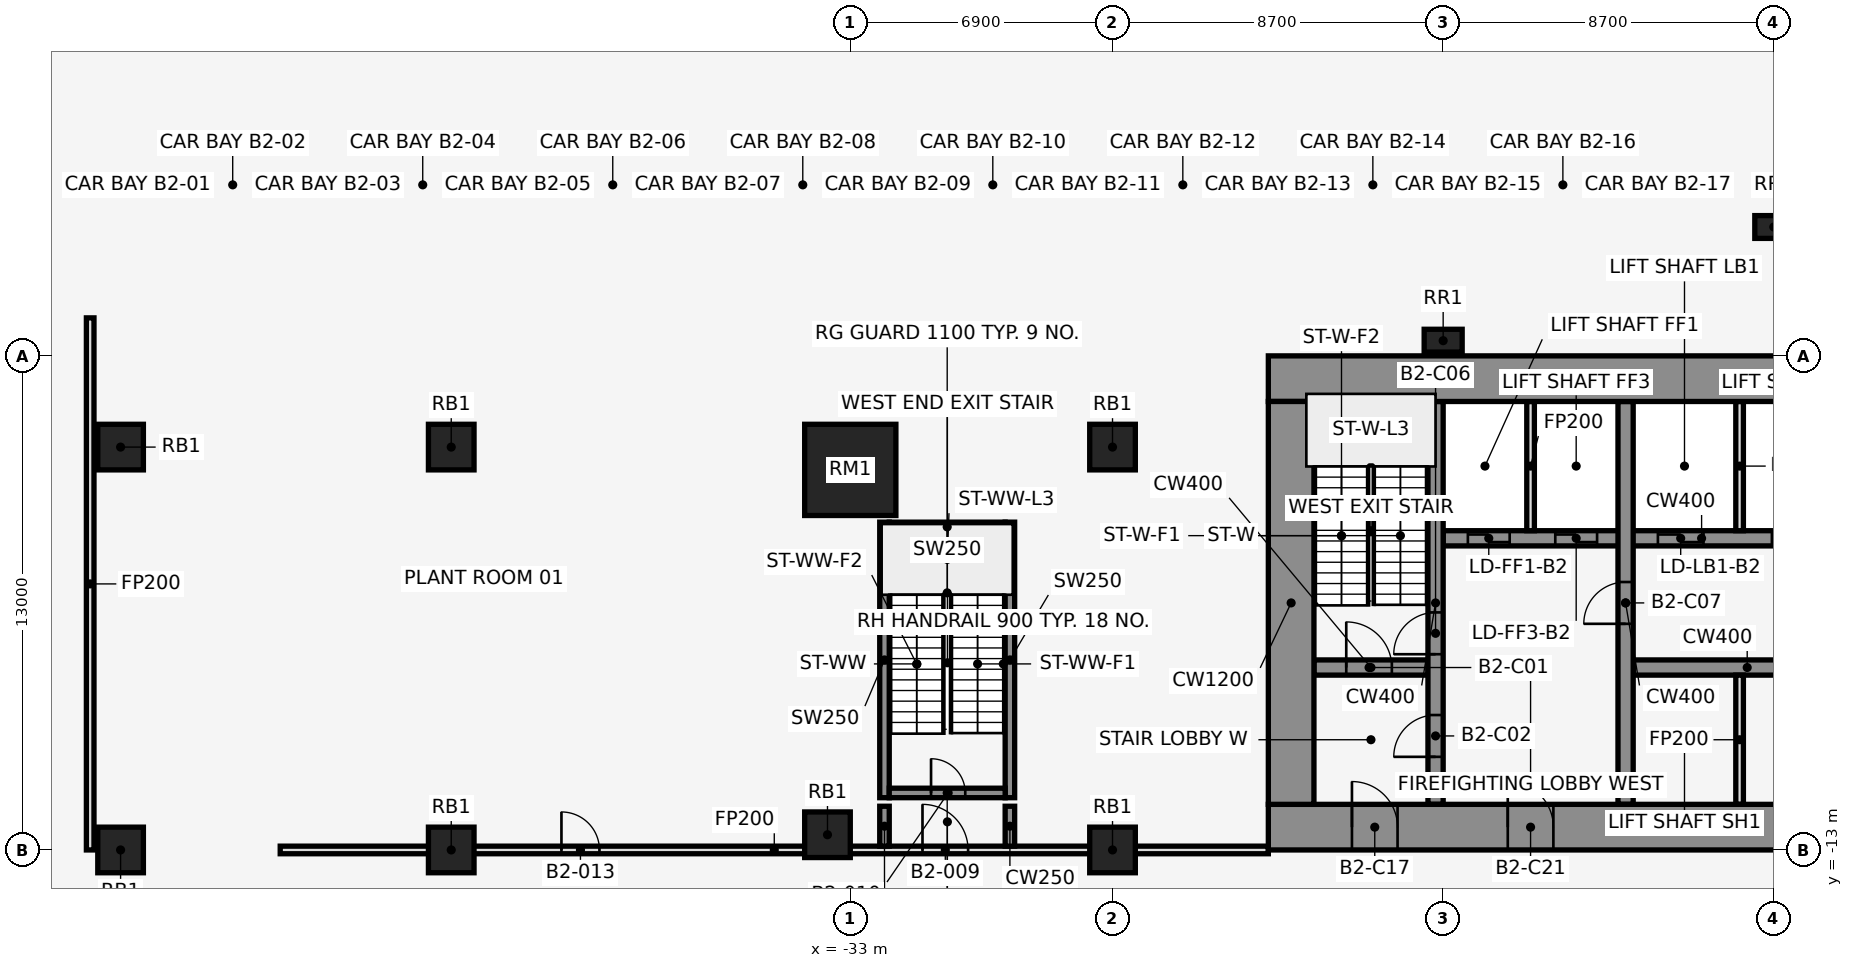
"""IFC4 building model, lengths in metres.
Left out: names, types, materials, properties, quantities, classifications, styles, units other than length and angle.
Written with IfcOpenShell. Run it as: python <this file> out.ifc"""

import sys

from ifc_helpers import new_model, si_unit, direction, frame, frame_2d, origin, origin_2d, place, context, subcontext, project, spatial, rectangle, extrude, element, fill, save


model = new_model("IFC4")
c1 = context("Model", 3, precision=1e-05, world=origin(), true_north=direction((0.0, 1.0)))
c2 = subcontext(c1, "Body", "Model", "MODEL_VIEW")
j1 = project(units=[si_unit("LENGTHUNIT", "METRE"), si_unit("PLANEANGLEUNIT", "RADIAN")], contexts=[c1])
p1 = place(None, origin())
s1 = spatial("IfcSite", under=j1, at=p1, CompositionType="ELEMENT")
p2 = place(p1, origin())
s2 = spatial("IfcBuilding", under=s1, at=p2, CompositionType="ELEMENT")
p3 = place(p2, frame((0.0, 0.0, -10.0)))
s3 = spatial("IfcBuildingStorey", under=s2, at=p3, CompositionType="ELEMENT", Elevation=-10.0)
p4 = place(p3, frame((-33.0, -3.0, 0.0), z_axis=(0.0, 0.0, 1.0), x_axis=(1.0, 0.0, 0.0)))
e1 = element("IfcColumn", 1, at=p4, inside=s3, PredefinedType="COLUMN", context=c2, shape_type="SweptSolid", body=[
    extrude(rectangle(XDim=2.4, YDim=2.4, at=origin_2d()), origin(), (0.0, 0.0, 1.0), 5.0),
])
p5 = place(p3, frame((-26.1, -2.4, 0.0), z_axis=(0.0, 0.0, 1.0), x_axis=(1.0, 0.0, 0.0)))
e2 = element("IfcColumn", 2, at=p5, inside=s3, PredefinedType="COLUMN", context=c2, shape_type="SweptSolid", body=[
    extrude(rectangle(XDim=1.2, YDim=1.2, at=origin_2d()), origin(), (0.0, 0.0, 1.0), 5.0),
])
for number, where, z_axis, x_axis in (
    (3, (-8.7, 3.391, 0.0), (0.0, 0.0, 1.0), (1.0, 0.0, 0.0)),
    (4, (-17.4, 0.4, 0.0), (0.0, 0.0, 1.0), (1.0, 0.0, 0.0)),
):
    element("IfcColumn", number, at=place(p3, frame(where, z_axis=z_axis, x_axis=x_axis)), inside=s3, PredefinedType="COLUMN", context=c2, shape_type="SweptSolid", body=[
        extrude(rectangle(XDim=1.0, YDim=0.6, at=origin_2d()), origin(), (0.0, 0.0, 1.0), 5.0),
    ])
for number, where, z_axis, x_axis in (
    (5, (-33.6, -12.6, 0.0), (0.0, 0.0, 1.0), (1.0, 0.0, 0.0)),
    (6, (-52.2, -2.4, 0.0), (0.0, 0.0, 1.0), (1.0, 0.0, 0.0)),
    (7, (-52.2, -13.0, 0.0), (0.0, 0.0, 1.0), (1.0, 0.0, 0.0)),
    (8, (-43.5, -2.4, 0.0), (0.0, 0.0, 1.0), (1.0, 0.0, 0.0)),
    (9, (-43.5, -13.0, 0.0), (0.0, 0.0, 1.0), (1.0, 0.0, 0.0)),
    (10, (-26.1, -13.0, 0.0), (0.0, 0.0, 1.0), (1.0, 0.0, 0.0)),
):
    element("IfcColumn", number, at=place(p3, frame(where, z_axis=z_axis, x_axis=x_axis)), inside=s3, PredefinedType="COLUMN", context=c2, shape_type="SweptSolid", body=[
        extrude(rectangle(XDim=1.2, YDim=1.2, at=origin_2d()), origin(), (0.0, 0.0, 1.0), 5.0),
    ])
for number, where, z_axis, x_axis in (
    (11, (-32.1, -11.625, 0.0), (0.0, 0.0, 1.0), (0.0, 1.0, 0.0)),
    (12, (-28.8, -11.625, 0.0), (0.0, 0.0, 1.0), (0.0, 1.0, 0.0)),
):
    element("IfcWall", number, at=place(p3, frame(where, z_axis=z_axis, x_axis=x_axis)), inside=s3, PredefinedType="SHEAR", context=c2, shape_type="SweptSolid", body=[
        extrude(rectangle(XDim=7.25, YDim=0.25, at=frame_2d((3.625, 0.0))), origin(), (0.0, 0.0, 1.0), 5.0),
    ])
p6 = place(p3, frame((-31.975, -11.5, 0.0), z_axis=(0.0, 0.0, 1.0), x_axis=(1.0, 0.0, 0.0)))
e13 = element("IfcWall", 13, at=p6, inside=s3, PredefinedType="SHEAR", context=c2, shape_type="SweptSolid", body=[
    extrude(rectangle(XDim=3.05, YDim=0.25, at=frame_2d((1.525, 0.0))), origin(), (0.0, 0.0, 1.0), 5.0),
])
p7 = place(p6, frame((1.1, 0.0, 0.0)))
e14 = element("IfcOpeningElement", 14, at=p7, cuts=e13, PredefinedType="OPENING", context=c2, shape_type="SweptSolid", body=[
    extrude(rectangle(XDim=0.9, YDim=2.1, at=frame_2d((0.45, 1.05))), frame((0.0, 0.137, 0.0), z_axis=(0.0, -1.0, 0.0), x_axis=(1.0, 0.0, 0.0)), (0.0, 0.0, 1.0), 0.274),
])
p8 = place(p3, frame((-31.975, -4.5, 0.0), z_axis=(0.0, 0.0, 1.0), x_axis=(1.0, 0.0, 0.0)))
e15 = element("IfcWall", 15, at=p8, inside=s3, PredefinedType="SHEAR", context=c2, shape_type="SweptSolid", body=[
    extrude(rectangle(XDim=3.05, YDim=0.25, at=frame_2d((1.525, 0.0))), origin(), (0.0, 0.0, 1.0), 5.0),
])
p9 = place(p3, frame((-48.0, -13.0, 0.0), z_axis=(0.0, 0.0, 1.0), x_axis=(1.0, 0.0, 0.0)))
e16 = element("IfcWall", 16, at=p9, inside=s3, PredefinedType="PARTITIONING", context=c2, shape_type="SweptSolid", body=[
    extrude(rectangle(XDim=26.0, YDim=0.2, at=frame_2d((13.0, 0.0))), origin(), (0.0, 0.0, 1.0), 4.7),
])
p10 = place(p9, frame((16.9, 0.0, 0.0)))
e17 = element("IfcOpeningElement", 17, at=p10, cuts=e16, PredefinedType="OPENING", context=c2, shape_type="SweptSolid", body=[
    extrude(rectangle(XDim=1.2, YDim=2.1, at=frame_2d((0.6, 1.05))), frame((0.0, 0.112, 0.0), z_axis=(0.0, -1.0, 0.0), x_axis=(1.0, 0.0, 0.0)), (0.0, 0.0, 1.0), 0.224),
])
p11 = place(p9, frame((7.4, 0.0, 0.0)))
e18 = element("IfcOpeningElement", 18, at=p11, cuts=e16, PredefinedType="OPENING", context=c2, shape_type="SweptSolid", body=[
    extrude(rectangle(XDim=1.0, YDim=2.1, at=frame_2d((0.5, 1.05))), frame((0.0, 0.112, 0.0), z_axis=(0.0, -1.0, 0.0), x_axis=(1.0, 0.0, 0.0)), (0.0, 0.0, 1.0), 0.224),
])
p12 = place(p3, frame((-53.0, -13.0, 0.0), z_axis=(0.0, 0.0, 1.0), x_axis=(0.0, 1.0, 0.0)))
e19 = element("IfcWall", 19, at=p12, inside=s3, PredefinedType="PARTITIONING", context=c2, shape_type="SweptSolid", body=[
    extrude(rectangle(XDim=14.0, YDim=0.2, at=frame_2d((7.0, 0.0))), origin(), (0.0, 0.0, 1.0), 4.7),
])
for number, where, z_axis, x_axis in (
    (20, (-32.1, -12.9, 0.0), (0.0, 0.0, 1.0), (0.0, 1.0, 0.0)),
    (21, (-28.8, -12.9, 0.0), (0.0, 0.0, 1.0), (0.0, 1.0, 0.0)),
):
    element("IfcWall", number, at=place(p3, frame(where, z_axis=z_axis, x_axis=x_axis)), inside=s3, PredefinedType="SHEAR", context=c2, shape_type="SweptSolid", body=[
        extrude(rectangle(XDim=1.05, YDim=0.25, at=frame_2d((0.525, 0.0))), origin(), (0.0, 0.0, 1.0), 5.0),
    ])
p13 = place(p3, frame((-20.8, -8.2, 0.0), z_axis=(0.0, 0.0, 1.0), x_axis=(1.0, 0.0, 0.0)))
e22 = element("IfcWall", 22, at=p13, inside=s3, PredefinedType="SHEAR", context=c2, shape_type="SweptSolid", body=[
    extrude(rectangle(XDim=3.0, YDim=0.4, at=frame_2d((1.5, 0.0))), origin(), (0.0, 0.0, 1.0), 5.0),
])
p14 = place(p13, frame((0.85, 0.0, 0.0)))
e23 = element("IfcOpeningElement", 23, at=p14, cuts=e22, PredefinedType="OPENING", context=c2, shape_type="SweptSolid", body=[
    extrude(rectangle(XDim=1.2, YDim=2.1, at=frame_2d((0.6, 1.05))), frame((0.0, 0.212, 0.0), z_axis=(0.0, -1.0, 0.0), x_axis=(1.0, 0.0, 0.0)), (0.0, 0.0, 1.0), 0.424),
])
p15 = place(p3, frame((-12.4, -8.2, 0.0), z_axis=(0.0, 0.0, 1.0), x_axis=(1.0, 0.0, 0.0)))
e24 = element("IfcWall", 24, at=p15, inside=s3, PredefinedType="SHEAR", context=c2, shape_type="SweptSolid", body=[
    extrude(rectangle(XDim=6.0, YDim=0.4, at=frame_2d((3.0, 0.0))), origin(), (0.0, 0.0, 1.0), 5.0),
])
p16 = place(p3, frame((-17.4, -4.8, 0.0), z_axis=(0.0, 0.0, 1.0), x_axis=(1.0, 0.0, 0.0)))
e25 = element("IfcWall", 25, at=p16, inside=s3, PredefinedType="SHEAR", context=c2, shape_type="SweptSolid", body=[
    extrude(rectangle(XDim=13.6, YDim=0.4, at=frame_2d((6.8, 0.0))), origin(), (0.0, 0.0, 1.0), 5.0),
])
p17 = place(p16, frame((0.65, 0.0, 0.0)))
e26 = element("IfcOpeningElement", 26, at=p17, cuts=e25, PredefinedType="OPENING", context=c2, shape_type="SweptSolid", body=[
    extrude(rectangle(XDim=1.1, YDim=2.1, at=frame_2d((0.55, 1.05))), frame((0.0, 0.212, 0.0), z_axis=(0.0, -1.0, 0.0), x_axis=(1.0, 0.0, 0.0)), (0.0, 0.0, 1.0), 0.424),
])
p18 = place(p16, frame((2.95, 0.0, 0.0)))
e27 = element("IfcOpeningElement", 27, at=p18, cuts=e25, PredefinedType="OPENING", context=c2, shape_type="SweptSolid", body=[
    extrude(rectangle(XDim=1.1, YDim=2.1, at=frame_2d((0.55, 1.05))), frame((0.0, 0.212, 0.0), z_axis=(0.0, -1.0, 0.0), x_axis=(1.0, 0.0, 0.0)), (0.0, 0.0, 1.0), 0.424),
])
p19 = place(p16, frame((5.65, 0.0, 0.0)))
e28 = element("IfcOpeningElement", 28, at=p19, cuts=e25, PredefinedType="OPENING", context=c2, shape_type="SweptSolid", body=[
    extrude(rectangle(XDim=1.2, YDim=2.1, at=frame_2d((0.6, 1.05))), frame((0.0, 0.212, 0.0), z_axis=(0.0, -1.0, 0.0), x_axis=(1.0, 0.0, 0.0)), (0.0, 0.0, 1.0), 0.424),
])
p20 = place(p16, frame((8.65, 0.0, 0.0)))
e29 = element("IfcOpeningElement", 29, at=p20, cuts=e25, PredefinedType="OPENING", context=c2, shape_type="SweptSolid", body=[
    extrude(rectangle(XDim=1.2, YDim=2.1, at=frame_2d((0.6, 1.05))), frame((0.0, 0.212, 0.0), z_axis=(0.0, -1.0, 0.0), x_axis=(1.0, 0.0, 0.0)), (0.0, 0.0, 1.0), 0.424),
])
p21 = place(p16, frame((11.65, 0.0, 0.0)))
e30 = element("IfcOpeningElement", 30, at=p21, cuts=e25, PredefinedType="OPENING", context=c2, shape_type="SweptSolid", body=[
    extrude(rectangle(XDim=1.2, YDim=2.1, at=frame_2d((0.6, 1.05))), frame((0.0, 0.212, 0.0), z_axis=(0.0, -1.0, 0.0), x_axis=(1.0, 0.0, 0.0)), (0.0, 0.0, 1.0), 0.424),
])
p22 = place(p3, frame((-17.6, -11.8, 0.0), z_axis=(0.0, 0.0, 1.0), x_axis=(0.0, 1.0, 0.0)))
e31 = element("IfcWall", 31, at=p22, inside=s3, PredefinedType="SHEAR", context=c2, shape_type="SweptSolid", body=[
    extrude(rectangle(XDim=10.6, YDim=0.4, at=frame_2d((5.3, 0.0))), origin(), (0.0, 0.0, 1.0), 5.0),
])
p23 = place(p22, frame((1.25, 0.0, 0.0)))
e32 = element("IfcOpeningElement", 32, at=p23, cuts=e31, PredefinedType="OPENING", context=c2, shape_type="SweptSolid", body=[
    extrude(rectangle(XDim=1.1, YDim=2.1, at=frame_2d((0.55, 1.05))), frame((0.0, 0.212, 0.0), z_axis=(0.0, -1.0, 0.0), x_axis=(1.0, 0.0, 0.0)), (0.0, 0.0, 1.0), 0.424),
])
p24 = place(p22, frame((3.95, 0.0, 0.0)))
e33 = element("IfcOpeningElement", 33, at=p24, cuts=e31, PredefinedType="OPENING", context=c2, shape_type="SweptSolid", body=[
    extrude(rectangle(XDim=1.1, YDim=2.1, at=frame_2d((0.55, 1.05))), frame((0.0, 0.212, 0.0), z_axis=(0.0, -1.0, 0.0), x_axis=(1.0, 0.0, 0.0)), (0.0, 0.0, 1.0), 0.424),
])
p25 = place(p3, frame((-15.1, -4.6, 0.0), z_axis=(0.0, 0.0, 1.0), x_axis=(0.0, 1.0, 0.0)))
e34 = element("IfcWall", 34, at=p25, inside=s3, PredefinedType="PARTITIONING", context=c2, shape_type="SweptSolid", body=[
    extrude(rectangle(XDim=3.4, YDim=0.2, at=frame_2d((1.7, 0.0))), origin(), (0.0, 0.0, 1.0), 4.7),
])
p26 = place(p3, frame((-12.6, -11.8, 0.0), z_axis=(0.0, 0.0, 1.0), x_axis=(0.0, 1.0, 0.0)))
e35 = element("IfcWall", 35, at=p26, inside=s3, PredefinedType="SHEAR", context=c2, shape_type="SweptSolid", body=[
    extrude(rectangle(XDim=10.6, YDim=0.4, at=frame_2d((5.3, 0.0))), origin(), (0.0, 0.0, 1.0), 5.0),
])
p27 = place(p26, frame((4.75, 0.0, 0.0)))
e36 = element("IfcOpeningElement", 36, at=p27, cuts=e35, PredefinedType="OPENING", context=c2, shape_type="SweptSolid", body=[
    extrude(rectangle(XDim=1.1, YDim=2.1, at=frame_2d((0.55, 1.05))), frame((0.0, 0.212, 0.0), z_axis=(0.0, -1.0, 0.0), x_axis=(1.0, 0.0, 0.0)), (0.0, 0.0, 1.0), 0.424),
])
for number, where, z_axis, x_axis in (
    (37, (-9.6, -11.8, 0.0), (0.0, 0.0, 1.0), (0.0, 1.0, 0.0)),
    (38, (-9.6, -4.6, 0.0), (0.0, 0.0, 1.0), (0.0, 1.0, 0.0)),
):
    element("IfcWall", number, at=place(p3, frame(where, z_axis=z_axis, x_axis=x_axis)), inside=s3, PredefinedType="PARTITIONING", context=c2, shape_type="SweptSolid", body=[
        extrude(rectangle(XDim=3.4, YDim=0.2, at=frame_2d((1.7, 0.0))), origin(), (0.0, 0.0, 1.0), 4.7),
    ])
p28 = place(p3, frame((-22.0, -0.6, 0.0), z_axis=(0.0, 0.0, 1.0), x_axis=(1.0, 0.0, 0.0)))
e39 = element("IfcWall", 39, at=p28, inside=s3, PredefinedType="SHEAR", context=c2, shape_type="SweptSolid", body=[
    extrude(rectangle(XDim=44.0, YDim=1.2, at=frame_2d((22.0, 0.0))), origin(), (0.0, 0.0, 1.0), 5.0),
])
p29 = place(p3, frame((-22.0, -12.4, 0.0), z_axis=(0.0, 0.0, 1.0), x_axis=(1.0, 0.0, 0.0)))
e40 = element("IfcWall", 40, at=p29, inside=s3, PredefinedType="SHEAR", context=c2, shape_type="SweptSolid", body=[
    extrude(rectangle(XDim=44.0, YDim=1.2, at=frame_2d((22.0, 0.0))), origin(), (0.0, 0.0, 1.0), 5.0),
])
p30 = place(p29, frame((2.2, 0.0, 0.0)))
e41 = element("IfcOpeningElement", 41, at=p30, cuts=e40, PredefinedType="OPENING", context=c2, shape_type="SweptSolid", body=[
    extrude(rectangle(XDim=1.2, YDim=2.1, at=frame_2d((0.6, 1.05))), frame((0.0, 0.612, 0.0), z_axis=(0.0, -1.0, 0.0), x_axis=(1.0, 0.0, 0.0)), (0.0, 0.0, 1.0), 1.224),
])
p31 = place(p29, frame((21.4, 0.0, 0.0)))
e42 = element("IfcOpeningElement", 42, at=p31, cuts=e40, PredefinedType="OPENING", context=c2, shape_type="SweptSolid", body=[
    extrude(rectangle(XDim=1.2, YDim=2.1, at=frame_2d((0.6, 1.05))), frame((0.0, 0.612, 0.0), z_axis=(0.0, -1.0, 0.0), x_axis=(1.0, 0.0, 0.0)), (0.0, 0.0, 1.0), 1.224),
])
p32 = place(p29, frame((40.6, 0.0, 0.0)))
e43 = element("IfcOpeningElement", 43, at=p32, cuts=e40, PredefinedType="OPENING", context=c2, shape_type="SweptSolid", body=[
    extrude(rectangle(XDim=1.2, YDim=2.1, at=frame_2d((0.6, 1.05))), frame((0.0, 0.612, 0.0), z_axis=(0.0, -1.0, 0.0), x_axis=(1.0, 0.0, 0.0)), (0.0, 0.0, 1.0), 1.224),
])
p33 = place(p29, frame((16.0, 0.0, 0.0)))
e44 = element("IfcOpeningElement", 44, at=p33, cuts=e40, PredefinedType="OPENING", context=c2, shape_type="SweptSolid", body=[
    extrude(rectangle(XDim=1.8, YDim=2.1, at=frame_2d((0.9, 1.05))), frame((0.0, 0.612, 0.0), z_axis=(0.0, -1.0, 0.0), x_axis=(1.0, 0.0, 0.0)), (0.0, 0.0, 1.0), 1.224),
])
p34 = place(p29, frame((6.3, 0.0, 0.0)))
e45 = element("IfcOpeningElement", 45, at=p34, cuts=e40, PredefinedType="OPENING", context=c2, shape_type="SweptSolid", body=[
    extrude(rectangle(XDim=1.2, YDim=2.1, at=frame_2d((0.6, 1.05))), frame((0.0, 0.612, 0.0), z_axis=(0.0, -1.0, 0.0), x_axis=(1.0, 0.0, 0.0)), (0.0, 0.0, 1.0), 1.224),
])
p35 = place(p29, frame((26.2, 0.0, 0.0)))
e46 = element("IfcOpeningElement", 46, at=p35, cuts=e40, PredefinedType="OPENING", context=c2, shape_type="SweptSolid", body=[
    extrude(rectangle(XDim=1.8, YDim=2.1, at=frame_2d((0.9, 1.05))), frame((0.0, 0.612, 0.0), z_axis=(0.0, -1.0, 0.0), x_axis=(1.0, 0.0, 0.0)), (0.0, 0.0, 1.0), 1.224),
])
p36 = place(p29, frame((36.5, 0.0, 0.0)))
e47 = element("IfcOpeningElement", 47, at=p36, cuts=e40, PredefinedType="OPENING", context=c2, shape_type="SweptSolid", body=[
    extrude(rectangle(XDim=1.2, YDim=2.1, at=frame_2d((0.6, 1.05))), frame((0.0, 0.612, 0.0), z_axis=(0.0, -1.0, 0.0), x_axis=(1.0, 0.0, 0.0)), (0.0, 0.0, 1.0), 1.224),
])
p37 = place(p3, frame((-21.4, -11.8, 0.0), z_axis=(0.0, 0.0, 1.0), x_axis=(0.0, 1.0, 0.0)))
e48 = element("IfcWall", 48, at=p37, inside=s3, PredefinedType="SHEAR", context=c2, shape_type="SweptSolid", body=[
    extrude(rectangle(XDim=10.6, YDim=1.2, at=frame_2d((5.3, 0.0))), origin(), (0.0, 0.0, 1.0), 5.0),
])
p38 = place(p10, origin())
e49 = element("IfcDoor", 49, at=p38, inside=s3, OperationType="SINGLE_SWING_RIGHT", PredefinedType="DOOR", context=c2, shape_type="SweptSolid", body=[
    extrude(rectangle(XDim=1.2, YDim=2.1, at=frame_2d((0.6, 1.05))), frame((0.0, 0.025, 0.0), z_axis=(0.0, -1.0, 0.0), x_axis=(1.0, 0.0, 0.0)), (0.0, 0.0, 1.0), 0.05),
])
fill(e17, e49)
p39 = place(p7, origin())
e50 = element("IfcDoor", 50, at=p39, inside=s3, OperationType="SINGLE_SWING_LEFT", PredefinedType="DOOR", context=c2, shape_type="SweptSolid", body=[
    extrude(rectangle(XDim=0.9, YDim=2.1, at=frame_2d((0.45, 1.05))), frame((0.0, 0.025, 0.0), z_axis=(0.0, -1.0, 0.0), x_axis=(1.0, 0.0, 0.0)), (0.0, 0.0, 1.0), 0.05),
])
fill(e14, e50)
p40 = place(p11, origin())
e51 = element("IfcDoor", 51, at=p40, inside=s3, OperationType="SINGLE_SWING_LEFT", PredefinedType="DOOR", context=c2, shape_type="SweptSolid", body=[
    extrude(rectangle(XDim=1.0, YDim=2.1, at=frame_2d((0.5, 1.05))), frame((0.0, 0.025, 0.0), z_axis=(0.0, -1.0, 0.0), x_axis=(1.0, 0.0, 0.0)), (0.0, 0.0, 1.0), 0.05),
])
fill(e18, e51)
p41 = place(p14, origin())
e52 = element("IfcDoor", 52, at=p41, inside=s3, OperationType="SINGLE_SWING_LEFT", PredefinedType="DOOR", context=c2, shape_type="SweptSolid", body=[
    extrude(rectangle(XDim=1.2, YDim=2.1, at=frame_2d((0.6, 1.05))), frame((0.0, 0.025, 0.0), z_axis=(0.0, -1.0, 0.0), x_axis=(1.0, 0.0, 0.0)), (0.0, 0.0, 1.0), 0.05),
])
fill(e23, e52)
p42 = place(p23, frame((1.1, 0.0, 0.0), z_axis=(0.0, 0.0, 1.0), x_axis=(-1.0, 0.0, 0.0)))
e53 = element("IfcDoor", 53, at=p42, inside=s3, OperationType="SINGLE_SWING_LEFT", PredefinedType="DOOR", context=c2, shape_type="SweptSolid", body=[
    extrude(rectangle(XDim=1.1, YDim=2.1, at=frame_2d((0.55, 1.05))), frame((0.0, 0.025, 0.0), z_axis=(0.0, -1.0, 0.0), x_axis=(1.0, 0.0, 0.0)), (0.0, 0.0, 1.0), 0.05),
])
fill(e32, e53)
p43 = place(p17, origin())
e54 = element("IfcDoor", 54, at=p43, inside=s3, OperationType="DOUBLE_DOOR_SLIDING", PredefinedType="DOOR", context=c2, shape_type="SweptSolid", body=[
    extrude(rectangle(XDim=1.1, YDim=2.1, at=frame_2d((0.55, 1.05))), frame((0.0, 0.025, 0.0), z_axis=(0.0, -1.0, 0.0), x_axis=(1.0, 0.0, 0.0)), (0.0, 0.0, 1.0), 0.05),
])
fill(e26, e54)
p44 = place(p18, origin())
e55 = element("IfcDoor", 55, at=p44, inside=s3, OperationType="DOUBLE_DOOR_SLIDING", PredefinedType="DOOR", context=c2, shape_type="SweptSolid", body=[
    extrude(rectangle(XDim=1.1, YDim=2.1, at=frame_2d((0.55, 1.05))), frame((0.0, 0.025, 0.0), z_axis=(0.0, -1.0, 0.0), x_axis=(1.0, 0.0, 0.0)), (0.0, 0.0, 1.0), 0.05),
])
fill(e27, e55)
p45 = place(p19, origin())
e56 = element("IfcDoor", 56, at=p45, inside=s3, OperationType="DOUBLE_DOOR_SLIDING", PredefinedType="DOOR", context=c2, shape_type="SweptSolid", body=[
    extrude(rectangle(XDim=1.2, YDim=2.1, at=frame_2d((0.6, 1.05))), frame((0.0, 0.025, 0.0), z_axis=(0.0, -1.0, 0.0), x_axis=(1.0, 0.0, 0.0)), (0.0, 0.0, 1.0), 0.05),
])
fill(e28, e56)
p46 = place(p20, origin())
e57 = element("IfcDoor", 57, at=p46, inside=s3, OperationType="DOUBLE_DOOR_SLIDING", PredefinedType="DOOR", context=c2, shape_type="SweptSolid", body=[
    extrude(rectangle(XDim=1.2, YDim=2.1, at=frame_2d((0.6, 1.05))), frame((0.0, 0.025, 0.0), z_axis=(0.0, -1.0, 0.0), x_axis=(1.0, 0.0, 0.0)), (0.0, 0.0, 1.0), 0.05),
])
fill(e29, e57)
p47 = place(p24, frame((1.1, 0.0, 0.0), z_axis=(0.0, 0.0, 1.0), x_axis=(-1.0, 0.0, 0.0)))
e58 = element("IfcDoor", 58, at=p47, inside=s3, OperationType="SINGLE_SWING_LEFT", PredefinedType="DOOR", context=c2, shape_type="SweptSolid", body=[
    extrude(rectangle(XDim=1.1, YDim=2.1, at=frame_2d((0.55, 1.05))), frame((0.0, 0.025, 0.0), z_axis=(0.0, -1.0, 0.0), x_axis=(1.0, 0.0, 0.0)), (0.0, 0.0, 1.0), 0.05),
])
fill(e33, e58)
p48 = place(p27, origin())
e59 = element("IfcDoor", 59, at=p48, inside=s3, OperationType="SINGLE_SWING_LEFT", PredefinedType="DOOR", context=c2, shape_type="SweptSolid", body=[
    extrude(rectangle(XDim=1.1, YDim=2.1, at=frame_2d((0.55, 1.05))), frame((0.0, 0.025, 0.0), z_axis=(0.0, -1.0, 0.0), x_axis=(1.0, 0.0, 0.0)), (0.0, 0.0, 1.0), 0.05),
])
fill(e36, e59)
p49 = place(p30, frame((1.2, 0.0, 0.0), z_axis=(0.0, 0.0, 1.0), x_axis=(-1.0, 0.0, 0.0)))
e60 = element("IfcDoor", 60, at=p49, inside=s3, OperationType="SINGLE_SWING_RIGHT", PredefinedType="DOOR", context=c2, shape_type="SweptSolid", body=[
    extrude(rectangle(XDim=1.2, YDim=2.1, at=frame_2d((0.6, 1.05))), frame((0.0, 0.025, 0.0), z_axis=(0.0, -1.0, 0.0), x_axis=(1.0, 0.0, 0.0)), (0.0, 0.0, 1.0), 0.05),
])
fill(e41, e60)
p50 = place(p34, frame((1.2, 0.0, 0.0), z_axis=(0.0, 0.0, 1.0), x_axis=(-1.0, 0.0, 0.0)))
e61 = element("IfcDoor", 61, at=p50, inside=s3, OperationType="SINGLE_SWING_RIGHT", PredefinedType="DOOR", context=c2, shape_type="SweptSolid", body=[
    extrude(rectangle(XDim=1.2, YDim=2.1, at=frame_2d((0.6, 1.05))), frame((0.0, 0.025, 0.0), z_axis=(0.0, -1.0, 0.0), x_axis=(1.0, 0.0, 0.0)), (0.0, 0.0, 1.0), 0.05),
])
fill(e45, e61)
save(model, sys.argv[1])
